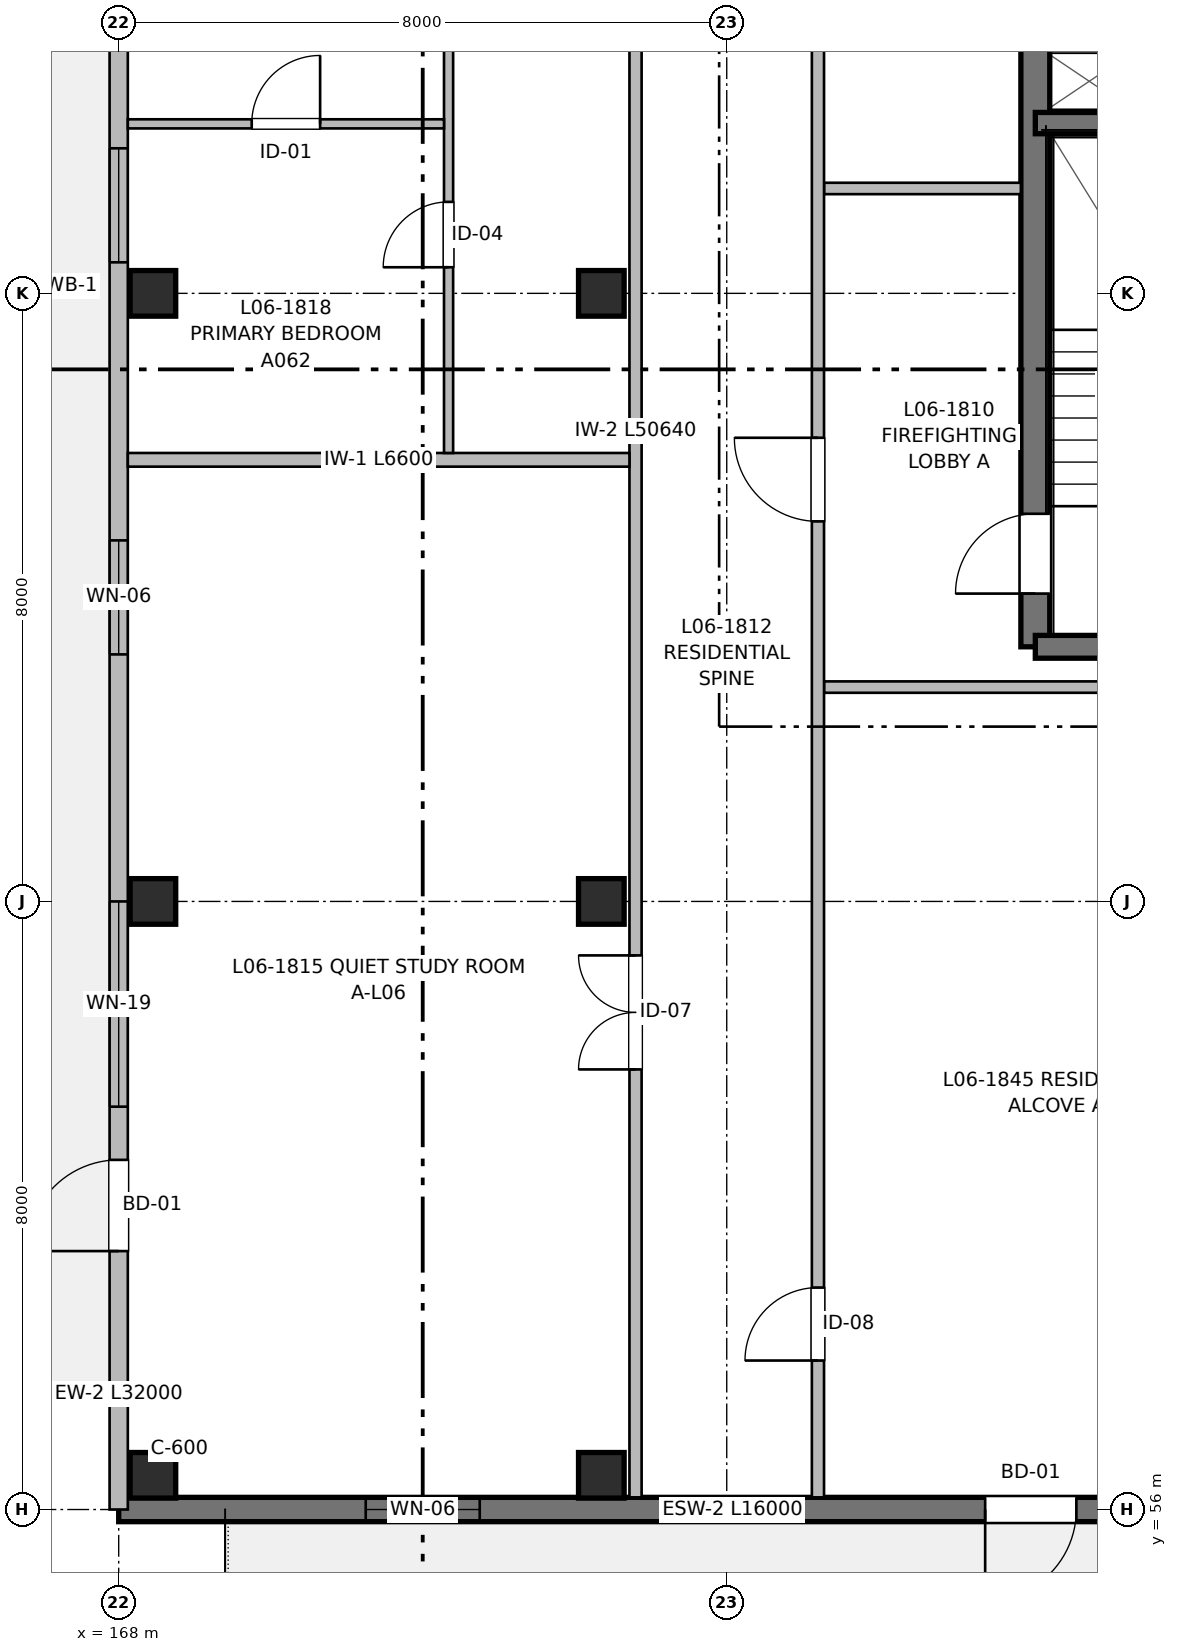
"""IFC4 building model, lengths in metres.
Left out: names, types, materials, properties, quantities, classifications, styles, units other than length and angle.
Written with IfcOpenShell. Run it as: python <this file> out.ifc"""

import sys

from ifc_helpers import new_model, si_unit, direction, frame, frame_2d, origin, origin_2d, place, context, subcontext, project, spatial, rectangle, extrude, element, fill, save


model = new_model("IFC4")
c1 = context("Model", 3, precision=1e-05, world=origin(), true_north=direction((0.0, 1.0)))
c2 = subcontext(c1, "Body", "Model", "MODEL_VIEW")
j1 = project(units=[si_unit("LENGTHUNIT", "METRE"), si_unit("PLANEANGLEUNIT", "RADIAN")], contexts=[c1])
p1 = place(None, origin())
s1 = spatial("IfcSite", under=j1, at=p1, CompositionType="ELEMENT")
p2 = place(p1, origin())
s2 = spatial("IfcBuilding", under=s1, at=p2, CompositionType="ELEMENT")
p3 = place(p2, frame((0.0, 0.0, 20.16)))
s3 = spatial("IfcBuildingStorey", under=s2, at=p3, CompositionType="ELEMENT", Elevation=20.16)
for number, where, z_axis, x_axis in (
    (1, (168.45, 56.45, 0.0), (0.0, 0.0, 1.0), (1.0, 0.0, 0.0)),
    (2, (168.45, 64.0, 0.0), (0.0, 0.0, 1.0), (1.0, 0.0, 0.0)),
    (3, (168.45, 72.0, 0.0), (0.0, 0.0, 1.0), (1.0, 0.0, 0.0)),
    (4, (174.35, 56.45, 0.0), (0.0, 0.0, 1.0), (1.0, 0.0, 0.0)),
    (5, (174.35, 64.0, 0.0), (0.0, 0.0, 1.0), (1.0, 0.0, 0.0)),
    (6, (174.35, 72.0, 0.0), (0.0, 0.0, 1.0), (1.0, 0.0, 0.0)),
):
    element("IfcColumn", number, at=place(p3, frame(where, z_axis=z_axis, x_axis=x_axis)), inside=s3, PredefinedType="COLUMN", context=c2, shape_type="SweptSolid", body=[
        extrude(rectangle(XDim=0.6, YDim=0.6, at=origin_2d()), origin(), (0.0, 0.0, 1.0), 3.2),
    ])
p4 = place(p3, frame((180.06, 67.35, 0.0), z_axis=(0.0, 0.0, 1.0), x_axis=(0.0, 1.0, 0.0)))
e7 = element("IfcWall", 7, at=p4, inside=s3, PredefinedType="SHEAR", context=c2, shape_type="SweptSolid", body=[
    extrude(rectangle(XDim=13.15, YDim=0.38, at=frame_2d((6.575, 0.0))), origin(), (0.0, 0.0, 1.0), 3.2),
])
p5 = place(p4, frame((0.7, 0.0, 0.0)))
e8 = element("IfcOpeningElement", 8, at=p5, cuts=e7, PredefinedType="OPENING", context=c2, shape_type="SweptSolid", body=[
    extrude(rectangle(XDim=1.05, YDim=2.15, at=frame_2d((0.525, 1.075))), frame((0.0, 0.2, 0.0), z_axis=(0.0, -1.0, 0.0), x_axis=(1.0, 0.0, 0.0)), (0.0, 0.0, 1.0), 0.4),
])
p6 = place(p3, frame((183.47, 67.35, 0.0), z_axis=(0.0, 0.0, 1.0), x_axis=(-1.0, 0.0, 0.0)))
e9 = element("IfcWall", 9, at=p6, inside=s3, PredefinedType="SHEAR", context=c2, shape_type="SweptSolid", body=[
    extrude(rectangle(XDim=3.41, YDim=0.3, at=frame_2d((1.705, 0.0))), origin(), (0.0, 0.0, 1.0), 3.2),
])
p7 = place(p3, frame((180.06, 74.24, 0.0), z_axis=(0.0, 0.0, 1.0), x_axis=(1.0, 0.0, 0.0)))
e10 = element("IfcWall", 10, at=p7, inside=s3, PredefinedType="SHEAR", context=c2, shape_type="SweptSolid", body=[
    extrude(rectangle(XDim=3.41, YDim=0.28, at=frame_2d((1.705, 0.0))), origin(), (0.0, 0.0, 1.0), 3.2),
])
p8 = place(p3, frame((184.0, 56.0, 0.0), z_axis=(0.0, 0.0, 1.0), x_axis=(-1.0, 0.0, 0.0)))
e11 = element("IfcWall", 11, at=p8, inside=s3, PredefinedType="SHEAR", context=c2, shape_type="SweptSolid", body=[
    extrude(rectangle(XDim=16.0, YDim=0.32, at=frame_2d((8.0, 0.0))), origin(), (0.0, 0.0, 1.0), 2.98),
])
p9 = place(p8, frame((3.4, 0.0, 0.0)))
e12 = element("IfcOpeningElement", 12, at=p9, cuts=e11, PredefinedType="OPENING", context=c2, shape_type="SweptSolid", body=[
    extrude(rectangle(XDim=1.2, YDim=2.2, at=frame_2d((0.6, 1.1))), frame((0.0, 0.17, 0.0), z_axis=(0.0, -1.0, 0.0), x_axis=(1.0, 0.0, 0.0)), (0.0, 0.0, 1.0), 0.34),
])
p10 = place(p8, frame((11.25, 0.0, 0.82)))
e13 = element("IfcOpeningElement", 13, at=p10, cuts=e11, PredefinedType="OPENING", context=c2, shape_type="SweptSolid", body=[
    extrude(rectangle(XDim=1.5, YDim=1.4, at=frame_2d((0.75, 0.7))), frame((0.0, 0.17, 0.0), z_axis=(0.0, -1.0, 0.0), x_axis=(1.0, 0.0, 0.0)), (0.0, 0.0, 1.0), 0.34),
])
p11 = place(p3, frame((168.0, 56.0, 0.0), z_axis=(0.0, 0.0, 1.0), x_axis=(0.0, 1.0, 0.0)))
e14 = element("IfcWall", 14, at=p11, inside=s3, PredefinedType="SOLIDWALL", context=c2, shape_type="SweptSolid", body=[
    extrude(rectangle(XDim=32.0, YDim=0.24, at=frame_2d((16.0, 0.0))), origin(), (0.0, 0.0, 1.0), 2.98),
])
p12 = place(p11, frame((3.4, 0.0, 0.0)))
e15 = element("IfcOpeningElement", 15, at=p12, cuts=e14, PredefinedType="OPENING", context=c2, shape_type="SweptSolid", body=[
    extrude(rectangle(XDim=1.2, YDim=2.2, at=frame_2d((0.6, 1.1))), frame((0.0, 0.13, 0.0), z_axis=(0.0, -1.0, 0.0), x_axis=(1.0, 0.0, 0.0)), (0.0, 0.0, 1.0), 0.26),
])
p13 = place(p11, frame((5.3, 0.0, 0.47)))
e16 = element("IfcOpeningElement", 16, at=p13, cuts=e14, PredefinedType="OPENING", context=c2, shape_type="SweptSolid", body=[
    extrude(rectangle(XDim=2.7, YDim=1.75, at=frame_2d((1.35, 0.875))), frame((0.0, 0.13, 0.0), z_axis=(0.0, -1.0, 0.0), x_axis=(1.0, 0.0, 0.0)), (0.0, 0.0, 1.0), 0.26),
])
p14 = place(p11, frame((11.25, 0.0, 0.82)))
e17 = element("IfcOpeningElement", 17, at=p14, cuts=e14, PredefinedType="OPENING", context=c2, shape_type="SweptSolid", body=[
    extrude(rectangle(XDim=1.5, YDim=1.4, at=frame_2d((0.75, 0.7))), frame((0.0, 0.13, 0.0), z_axis=(0.0, -1.0, 0.0), x_axis=(1.0, 0.0, 0.0)), (0.0, 0.0, 1.0), 0.26),
])
p15 = place(p11, frame((19.225, 0.0, 0.82)))
e18 = element("IfcOpeningElement", 18, at=p15, cuts=e14, PredefinedType="OPENING", context=c2, shape_type="SweptSolid", body=[
    extrude(rectangle(XDim=1.55, YDim=1.4, at=frame_2d((0.775, 0.7))), frame((0.0, 0.13, 0.0), z_axis=(0.0, -1.0, 0.0), x_axis=(1.0, 0.0, 0.0)), (0.0, 0.0, 1.0), 0.26),
])
p16 = place(p11, frame((28.15, 0.0, 0.87)))
e19 = element("IfcOpeningElement", 19, at=p16, cuts=e14, PredefinedType="OPENING", context=c2, shape_type="SweptSolid", body=[
    extrude(rectangle(XDim=1.4, YDim=1.35, at=frame_2d((0.7, 0.675))), frame((0.0, 0.13, 0.0), z_axis=(0.0, -1.0, 0.0), x_axis=(1.0, 0.0, 0.0)), (0.0, 0.0, 1.0), 0.26),
])
p17 = place(p11, frame((16.408, 0.0, 0.82)))
e20 = element("IfcOpeningElement", 20, at=p17, cuts=e14, PredefinedType="OPENING", context=c2, shape_type="SweptSolid", body=[
    extrude(rectangle(XDim=1.5, YDim=1.4, at=frame_2d((0.75, 0.7))), frame((0.0, 0.13, 0.0), z_axis=(0.0, -1.0, 0.0), x_axis=(1.0, 0.0, 0.0)), (0.0, 0.0, 1.0), 0.26),
])
p18 = place(p11, frame((25.13, 0.0, 0.82)))
e21 = element("IfcOpeningElement", 21, at=p18, cuts=e14, PredefinedType="OPENING", context=c2, shape_type="SweptSolid", body=[
    extrude(rectangle(XDim=1.5, YDim=1.4, at=frame_2d((0.75, 0.7))), frame((0.0, 0.13, 0.0), z_axis=(0.0, -1.0, 0.0), x_axis=(1.0, 0.0, 0.0)), (0.0, 0.0, 1.0), 0.26),
])
p19 = place(p3, frame((177.28, 66.82, 0.0), z_axis=(0.0, 0.0, 1.0), x_axis=(1.0, 0.0, 0.0)))
e22 = element("IfcWall", 22, at=p19, inside=s3, PredefinedType="PARTITIONING", context=c2, shape_type="SweptSolid", body=[
    extrude(rectangle(XDim=6.6, YDim=0.15, at=frame_2d((3.3, 0.0))), origin(), (0.0, 0.0, 1.0), 2.935),
])
p20 = place(p3, frame((177.28, 73.38, 0.0), z_axis=(0.0, 0.0, 1.0), x_axis=(1.0, 0.0, 0.0)))
e23 = element("IfcWall", 23, at=p20, inside=s3, PredefinedType="PARTITIONING", context=c2, shape_type="SweptSolid", body=[
    extrude(rectangle(XDim=2.59, YDim=0.15, at=frame_2d((1.295, 0.0))), origin(), (0.0, 0.0, 1.0), 2.935),
])
p21 = place(p3, frame((174.8, 56.16, 0.0), z_axis=(0.0, 0.0, 1.0), x_axis=(0.0, 1.0, 0.0)))
e24 = element("IfcWall", 24, at=p21, inside=s3, PredefinedType="PARTITIONING", context=c2, shape_type="SweptSolid", body=[
    extrude(rectangle(XDim=50.64, YDim=0.16, at=frame_2d((25.32, 0.0))), origin(), (0.0, 0.0, 1.0), 2.935),
])
p22 = place(p21, frame((5.63, 0.0, 0.0)))
e25 = element("IfcOpeningElement", 25, at=p22, cuts=e24, PredefinedType="OPENING", context=c2, shape_type="SweptSolid", body=[
    extrude(rectangle(XDim=1.5, YDim=2.2, at=frame_2d((0.75, 1.1))), frame((0.0, 0.09, 0.0), z_axis=(0.0, -1.0, 0.0), x_axis=(1.0, 0.0, 0.0)), (0.0, 0.0, 1.0), 0.18),
])
p23 = place(p21, frame((20.92, 0.0, 0.0)))
e26 = element("IfcOpeningElement", 26, at=p23, cuts=e24, PredefinedType="OPENING", context=c2, shape_type="SweptSolid", body=[
    extrude(rectangle(XDim=0.98, YDim=2.15, at=frame_2d((0.49, 1.075))), frame((0.0, 0.09, 0.0), z_axis=(0.0, -1.0, 0.0), x_axis=(1.0, 0.0, 0.0)), (0.0, 0.0, 1.0), 0.18),
])
p24 = place(p21, frame((33.68, 0.0, 0.0)))
e27 = element("IfcOpeningElement", 27, at=p24, cuts=e24, PredefinedType="OPENING", context=c2, shape_type="SweptSolid", body=[
    extrude(rectangle(XDim=0.98, YDim=2.15, at=frame_2d((0.49, 1.075))), frame((0.0, 0.09, 0.0), z_axis=(0.0, -1.0, 0.0), x_axis=(1.0, 0.0, 0.0)), (0.0, 0.0, 1.0), 0.18),
])
p25 = place(p21, frame((45.08, 0.0, 0.0)))
e28 = element("IfcOpeningElement", 28, at=p25, cuts=e24, PredefinedType="OPENING", context=c2, shape_type="SweptSolid", body=[
    extrude(rectangle(XDim=0.98, YDim=2.15, at=frame_2d((0.49, 1.075))), frame((0.0, 0.09, 0.0), z_axis=(0.0, -1.0, 0.0), x_axis=(1.0, 0.0, 0.0)), (0.0, 0.0, 1.0), 0.18),
])
p26 = place(p3, frame((177.2, 56.16, 0.0), z_axis=(0.0, 0.0, 1.0), x_axis=(0.0, 1.0, 0.0)))
e29 = element("IfcWall", 29, at=p26, inside=s3, PredefinedType="PARTITIONING", context=c2, shape_type="SweptSolid", body=[
    extrude(rectangle(XDim=50.64, YDim=0.16, at=frame_2d((25.32, 0.0))), origin(), (0.0, 0.0, 1.0), 2.935),
])
p27 = place(p26, frame((12.84, 0.0, 0.0)))
e30 = element("IfcOpeningElement", 30, at=p27, cuts=e29, PredefinedType="OPENING", context=c2, shape_type="SweptSolid", body=[
    extrude(rectangle(XDim=1.1, YDim=2.15, at=frame_2d((0.55, 1.075))), frame((0.0, 0.09, 0.0), z_axis=(0.0, -1.0, 0.0), x_axis=(1.0, 0.0, 0.0)), (0.0, 0.0, 1.0), 0.18),
])
p28 = place(p26, frame((19.24, 0.0, 0.0)))
e31 = element("IfcOpeningElement", 31, at=p28, cuts=e29, PredefinedType="OPENING", context=c2, shape_type="SweptSolid", body=[
    extrude(rectangle(XDim=1.6, YDim=2.15, at=frame_2d((0.8, 1.075))), frame((0.0, 0.09, 0.0), z_axis=(0.0, -1.0, 0.0), x_axis=(1.0, 0.0, 0.0)), (0.0, 0.0, 1.0), 0.18),
])
p29 = place(p26, frame((1.8, 0.0, 0.0)))
e32 = element("IfcOpeningElement", 32, at=p29, cuts=e29, PredefinedType="OPENING", context=c2, shape_type="SweptSolid", body=[
    extrude(rectangle(XDim=0.96, YDim=2.15, at=frame_2d((0.48, 1.075))), frame((0.0, 0.09, 0.0), z_axis=(0.0, -1.0, 0.0), x_axis=(1.0, 0.0, 0.0)), (0.0, 0.0, 1.0), 0.18),
])
p30 = place(p26, frame((32.57, 0.0, 0.0)))
e33 = element("IfcOpeningElement", 33, at=p30, cuts=e29, PredefinedType="OPENING", context=c2, shape_type="SweptSolid", body=[
    extrude(rectangle(XDim=0.98, YDim=2.15, at=frame_2d((0.49, 1.075))), frame((0.0, 0.09, 0.0), z_axis=(0.0, -1.0, 0.0), x_axis=(1.0, 0.0, 0.0)), (0.0, 0.0, 1.0), 0.18),
])
p31 = place(p26, frame((40.83, 0.0, 0.0)))
e34 = element("IfcOpeningElement", 34, at=p31, cuts=e29, PredefinedType="OPENING", context=c2, shape_type="SweptSolid", body=[
    extrude(rectangle(XDim=0.98, YDim=2.15, at=frame_2d((0.49, 1.075))), frame((0.0, 0.09, 0.0), z_axis=(0.0, -1.0, 0.0), x_axis=(1.0, 0.0, 0.0)), (0.0, 0.0, 1.0), 0.18),
])
p32 = place(p3, frame((168.12, 69.81, 0.0), z_axis=(0.0, 0.0, 1.0), x_axis=(1.0, 0.0, 0.0)))
e35 = element("IfcWall", 35, at=p32, inside=s3, PredefinedType="PARTITIONING", context=c2, shape_type="SweptSolid", body=[
    extrude(rectangle(XDim=6.6, YDim=0.18, at=frame_2d((3.3, 0.0))), origin(), (0.0, 0.0, 1.0), 2.935),
])
p33 = place(p3, frame((172.34, 69.9, 0.0), z_axis=(0.0, 0.0, 1.0), x_axis=(0.0, 1.0, 0.0)))
e36 = element("IfcWall", 36, at=p33, inside=s3, PredefinedType="PARTITIONING", context=c2, shape_type="SweptSolid", body=[
    extrude(rectangle(XDim=13.98, YDim=0.12, at=frame_2d((6.99, 0.0))), origin(), (0.0, 0.0, 1.0), 2.935),
])
p34 = place(p33, frame((2.443, 0.0, 0.0)))
e37 = element("IfcOpeningElement", 37, at=p34, cuts=e36, PredefinedType="OPENING", context=c2, shape_type="SweptSolid", body=[
    extrude(rectangle(XDim=0.86, YDim=2.1, at=frame_2d((0.43, 1.05))), frame((0.0, 0.07, 0.0), z_axis=(0.0, -1.0, 0.0), x_axis=(1.0, 0.0, 0.0)), (0.0, 0.0, 1.0), 0.14),
])
p35 = place(p33, frame((8.544, 0.0, 0.0)))
e38 = element("IfcOpeningElement", 38, at=p35, cuts=e36, PredefinedType="OPENING", context=c2, shape_type="SweptSolid", body=[
    extrude(rectangle(XDim=0.92, YDim=2.1, at=frame_2d((0.46, 1.05))), frame((0.0, 0.07, 0.0), z_axis=(0.0, -1.0, 0.0), x_axis=(1.0, 0.0, 0.0)), (0.0, 0.0, 1.0), 0.14),
])
p36 = place(p3, frame((168.12, 74.23, 0.0), z_axis=(0.0, 0.0, 1.0), x_axis=(1.0, 0.0, 0.0)))
e39 = element("IfcWall", 39, at=p36, inside=s3, PredefinedType="PARTITIONING", context=c2, shape_type="SweptSolid", body=[
    extrude(rectangle(XDim=4.16, YDim=0.12, at=frame_2d((2.08, 0.0))), origin(), (0.0, 0.0, 1.0), 2.935),
])
p37 = place(p36, frame((1.63, 0.0, 0.0)))
e40 = element("IfcOpeningElement", 40, at=p37, cuts=e39, PredefinedType="OPENING", context=c2, shape_type="SweptSolid", body=[
    extrude(rectangle(XDim=0.9, YDim=2.1, at=frame_2d((0.45, 1.05))), frame((0.0, 0.07, 0.0), z_axis=(0.0, -1.0, 0.0), x_axis=(1.0, 0.0, 0.0)), (0.0, 0.0, 1.0), 0.14),
])
p38 = place(p5, origin())
e41 = element("IfcDoor", 41, at=p38, inside=s3, OperationType="SINGLE_SWING_LEFT", PredefinedType="DOOR", context=c2, shape_type="SweptSolid", body=[
    extrude(rectangle(XDim=1.05, YDim=2.15, at=frame_2d((0.525, 1.075))), frame((0.0, 0.025, 0.0), z_axis=(0.0, -1.0, 0.0), x_axis=(1.0, 0.0, 0.0)), (0.0, 0.0, 1.0), 0.05),
])
fill(e8, e41)
p39 = place(p9, origin())
e42 = element("IfcDoor", 42, at=p39, inside=s3, OperationType="SINGLE_SWING_RIGHT", PredefinedType="DOOR", context=c2, shape_type="SweptSolid", body=[
    extrude(rectangle(XDim=1.2, YDim=2.2, at=frame_2d((0.6, 1.1))), frame((0.0, 0.025, 0.0), z_axis=(0.0, -1.0, 0.0), x_axis=(1.0, 0.0, 0.0)), (0.0, 0.0, 1.0), 0.05),
])
fill(e12, e42)
p40 = place(p10, origin())
e43 = element("IfcWindow", 43, at=p40, inside=s3, PartitioningType="SINGLE_PANEL", PredefinedType="WINDOW", context=c2, shape_type="SweptSolid", body=[
    extrude(rectangle(XDim=1.5, YDim=1.4, at=frame_2d((0.75, 0.7))), frame((0.0, 0.03, 0.0), z_axis=(0.0, -1.0, 0.0), x_axis=(1.0, 0.0, 0.0)), (0.0, 0.0, 1.0), 0.06),
])
fill(e13, e43)
p41 = place(p12, origin())
e44 = element("IfcDoor", 44, at=p41, inside=s3, OperationType="SINGLE_SWING_LEFT", PredefinedType="DOOR", context=c2, shape_type="SweptSolid", body=[
    extrude(rectangle(XDim=1.2, YDim=2.2, at=frame_2d((0.6, 1.1))), frame((0.0, 0.025, 0.0), z_axis=(0.0, -1.0, 0.0), x_axis=(1.0, 0.0, 0.0)), (0.0, 0.0, 1.0), 0.05),
])
fill(e15, e44)
p42 = place(p13, origin())
e45 = element("IfcWindow", 45, at=p42, inside=s3, PartitioningType="SINGLE_PANEL", PredefinedType="WINDOW", context=c2, shape_type="SweptSolid", body=[
    extrude(rectangle(XDim=2.7, YDim=1.75, at=frame_2d((1.35, 0.875))), frame((0.0, 0.03, 0.0), z_axis=(0.0, -1.0, 0.0), x_axis=(1.0, 0.0, 0.0)), (0.0, 0.0, 1.0), 0.06),
])
fill(e16, e45)
p43 = place(p14, origin())
e46 = element("IfcWindow", 46, at=p43, inside=s3, PartitioningType="SINGLE_PANEL", PredefinedType="WINDOW", context=c2, shape_type="SweptSolid", body=[
    extrude(rectangle(XDim=1.5, YDim=1.4, at=frame_2d((0.75, 0.7))), frame((0.0, 0.03, 0.0), z_axis=(0.0, -1.0, 0.0), x_axis=(1.0, 0.0, 0.0)), (0.0, 0.0, 1.0), 0.06),
])
fill(e17, e46)
p44 = place(p27, origin())
e47 = element("IfcDoor", 47, at=p44, inside=s3, OperationType="SINGLE_SWING_RIGHT", PredefinedType="DOOR", context=c2, shape_type="SweptSolid", body=[
    extrude(rectangle(XDim=1.1, YDim=2.15, at=frame_2d((0.55, 1.075))), frame((0.0, 0.025, 0.0), z_axis=(0.0, -1.0, 0.0), x_axis=(1.0, 0.0, 0.0)), (0.0, 0.0, 1.0), 0.05),
])
fill(e30, e47)
p45 = place(p22, origin())
e48 = element("IfcDoor", 48, at=p45, inside=s3, OperationType="DOUBLE_DOOR_SINGLE_SWING", PredefinedType="DOOR", context=c2, shape_type="SweptSolid", body=[
    extrude(rectangle(XDim=1.5, YDim=2.2, at=frame_2d((0.75, 1.1))), frame((0.0, 0.025, 0.0), z_axis=(0.0, -1.0, 0.0), x_axis=(1.0, 0.0, 0.0)), (0.0, 0.0, 1.0), 0.05),
])
fill(e25, e48)
p46 = place(p34, origin())
e49 = element("IfcDoor", 49, at=p46, inside=s3, OperationType="SINGLE_SWING_LEFT", PredefinedType="DOOR", context=c2, shape_type="SweptSolid", body=[
    extrude(rectangle(XDim=0.86, YDim=2.1, at=frame_2d((0.43, 1.05))), frame((0.0, 0.025, 0.0), z_axis=(0.0, -1.0, 0.0), x_axis=(1.0, 0.0, 0.0)), (0.0, 0.0, 1.0), 0.05),
])
fill(e37, e49)
p47 = place(p37, origin())
e50 = element("IfcDoor", 50, at=p47, inside=s3, OperationType="SINGLE_SWING_RIGHT", PredefinedType="DOOR", context=c2, shape_type="SweptSolid", body=[
    extrude(rectangle(XDim=0.9, YDim=2.1, at=frame_2d((0.45, 1.05))), frame((0.0, 0.025, 0.0), z_axis=(0.0, -1.0, 0.0), x_axis=(1.0, 0.0, 0.0)), (0.0, 0.0, 1.0), 0.05),
])
fill(e40, e50)
p48 = place(p29, origin())
e51 = element("IfcDoor", 51, at=p48, inside=s3, OperationType="SINGLE_SWING_LEFT", PredefinedType="DOOR", context=c2, shape_type="SweptSolid", body=[
    extrude(rectangle(XDim=0.96, YDim=2.15, at=frame_2d((0.48, 1.075))), frame((0.0, 0.025, 0.0), z_axis=(0.0, -1.0, 0.0), x_axis=(1.0, 0.0, 0.0)), (0.0, 0.0, 1.0), 0.05),
])
fill(e32, e51)
p49 = place(p17, origin())
e52 = element("IfcWindow", 52, at=p49, inside=s3, PartitioningType="SINGLE_PANEL", PredefinedType="WINDOW", context=c2, shape_type="SweptSolid", body=[
    extrude(rectangle(XDim=1.5, YDim=1.4, at=frame_2d((0.75, 0.7))), frame((0.0, 0.03, 0.0), z_axis=(0.0, -1.0, 0.0), x_axis=(1.0, 0.0, 0.0)), (0.0, 0.0, 1.0), 0.06),
])
fill(e20, e52)
save(model, sys.argv[1])
